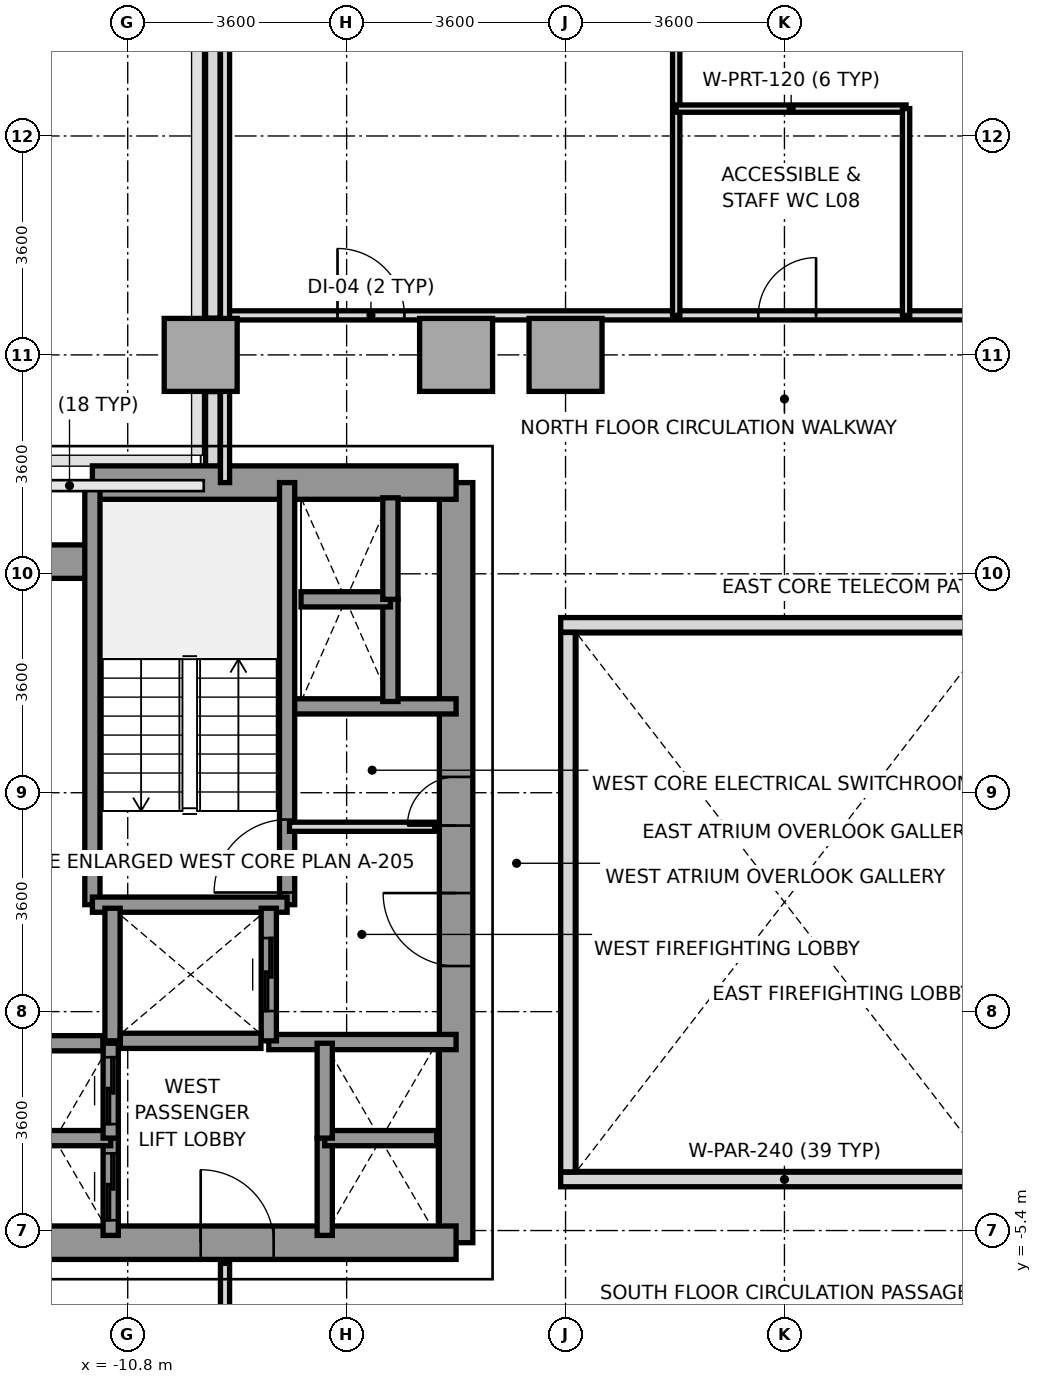
"""IFC4 building model, lengths in metres.
Left out: names, types, materials, properties, quantities, classifications, styles, units other than length and angle.
Written with IfcOpenShell. Run it as: python <this file> out.ifc"""

import sys

from ifc_helpers import new_model, si_unit, direction, frame, frame_2d, origin, origin_2d, place, context, subcontext, project, spatial, rectangle, extrude, source, transform, mapped, element, fill, save


model = new_model("IFC4")
c1 = context("Model", 3, precision=1e-05, world=origin(), true_north=direction((0.0, 1.0)))
c2 = subcontext(c1, "Body", "Model", "MODEL_VIEW")
j1 = project(units=[si_unit("LENGTHUNIT", "METRE"), si_unit("PLANEANGLEUNIT", "RADIAN")], contexts=[c1])
p1 = place(None, origin())
s1 = spatial("IfcSite", under=j1, at=p1, CompositionType="ELEMENT")
p2 = place(p1, origin())
s2 = spatial("IfcBuilding", under=s1, at=p2, CompositionType="ELEMENT")
p3 = place(p2, frame((0.0, 0.0, 37.4)))
s3 = spatial("IfcBuildingStorey", under=s2, at=p3, CompositionType="ELEMENT", Elevation=37.4)
m1 = source(origin(), c2, "Body", "SweptSolid", [
    extrude(rectangle(XDim=1.2, YDim=1.2, at=origin_2d()), origin(), (0.0, 0.0, 1.0), 3.2),
])
for number, where, z_axis, x_axis in (
    (1, (-9.6, 9.0, 0.0), (0.0, 0.0, 1.0), (1.0, 0.0, 0.0)),
    (2, (-5.4, 9.0, 0.0), (0.0, 0.0, 1.0), (1.0, 0.0, 0.0)),
    (3, (-3.6, 9.0, 0.0), (0.0, 0.0, 1.0), (1.0, 0.0, 0.0)),
):
    element("IfcColumn", number, at=place(p3, frame(where, z_axis=z_axis, x_axis=x_axis)), inside=s3, PredefinedType="COLUMN", context=c2, shape_type="MappedRepresentation", body=[
        mapped(m1, transform((0.0, 0.0, 0.0), x_axis=(1.0, 0.0, 0.0), y_axis=(0.0, 1.0, 0.0), z_axis=(0.0, 0.0, 1.0), scale=1.0)),
    ])
p4 = place(p3, frame((-9.4, 6.953, 0.0), z_axis=(0.0, 0.0, 1.0), x_axis=(0.0, 1.0, 0.0)))
e4 = element("IfcWall", 4, at=p4, inside=s3, PredefinedType="PARAPET", context=c2, shape_type="SweptSolid", body=[
    extrude(rectangle(XDim=1.444, YDim=0.24, at=frame_2d((0.722, 0.0))), origin(), (0.0, 0.0, 1.0), 1.15),
])
p5 = place(p3, frame((-9.4, 9.603, 0.0), z_axis=(0.0, 0.0, 1.0), x_axis=(0.0, 1.0, 0.0)))
e5 = element("IfcWall", 5, at=p5, inside=s3, PredefinedType="PARAPET", context=c2, shape_type="SweptSolid", body=[
    extrude(rectangle(XDim=6.0, YDim=0.24, at=frame_2d((3.0, 0.0))), origin(), (0.0, 0.0, 1.0), 1.15),
])
p6 = place(p3, frame((-5.4, -5.6, 0.0), z_axis=(0.0, 0.0, 1.0), x_axis=(0.0, 1.0, 0.0)))
e6 = element("IfcWall", 6, at=p6, inside=s3, PredefinedType="SHEAR", context=c2, shape_type="SweptSolid", body=[
    extrude(rectangle(XDim=12.5, YDim=0.55, at=frame_2d((6.25, 0.0))), origin(), (0.0, 0.0, 1.0), 3.2),
])
p7 = place(p6, frame((4.55, 0.0, 0.0)))
e7 = element("IfcOpeningElement", 7, at=p7, cuts=e6, PredefinedType="OPENING", context=c2, shape_type="SweptSolid", body=[
    extrude(rectangle(XDim=1.2, YDim=2.2, at=frame_2d((0.6, 1.1))), frame((0.0, 0.285, 0.0), z_axis=(0.0, -1.0, 0.0), x_axis=(1.0, 0.0, 0.0)), (0.0, 0.0, 1.0), 0.57),
])
p8 = place(p6, frame((6.86, 0.0, 0.0)))
e8 = element("IfcOpeningElement", 8, at=p8, cuts=e6, PredefinedType="OPENING", context=c2, shape_type="SweptSolid", body=[
    extrude(rectangle(XDim=0.8, YDim=2.1, at=frame_2d((0.4, 1.05))), frame((0.0, 0.285, 0.0), z_axis=(0.0, -1.0, 0.0), x_axis=(1.0, 0.0, 0.0)), (0.0, 0.0, 1.0), 0.57),
])
p9 = place(p3, frame((-11.381, 6.9, 0.0), z_axis=(0.0, 0.0, 1.0), x_axis=(1.0, 0.0, 0.0)))
e9 = element("IfcWall", 9, at=p9, inside=s3, PredefinedType="SHEAR", context=c2, shape_type="SweptSolid", body=[
    extrude(rectangle(XDim=5.981, YDim=0.55, at=frame_2d((2.991, 0.0))), origin(), (0.0, 0.0, 1.0), 3.2),
])
p10 = place(p3, frame((-13.2, 5.6, 0.0), z_axis=(0.0, 0.0, 1.0), x_axis=(1.0, 0.0, 0.0)))
e10 = element("IfcWall", 10, at=p10, inside=s3, PredefinedType="SHEAR", context=c2, shape_type="SweptSolid", body=[
    extrude(rectangle(XDim=1.819, YDim=0.55, at=frame_2d((0.909, 0.0))), origin(), (0.0, 0.0, 1.0), 3.2),
])
p11 = place(p3, frame((-13.2, -5.6, 0.0), z_axis=(0.0, 0.0, 1.0), x_axis=(1.0, 0.0, 0.0)))
e11 = element("IfcWall", 11, at=p11, inside=s3, PredefinedType="SHEAR", context=c2, shape_type="SweptSolid", body=[
    extrude(rectangle(XDim=7.8, YDim=0.55, at=frame_2d((3.9, 0.0))), origin(), (0.0, 0.0, 1.0), 3.2),
])
p12 = place(p11, frame((3.6, 0.0, 0.0)))
e12 = element("IfcOpeningElement", 12, at=p12, cuts=e11, PredefinedType="OPENING", context=c2, shape_type="SweptSolid", body=[
    extrude(rectangle(XDim=1.2, YDim=2.2, at=frame_2d((0.6, 1.1))), frame((0.0, 0.285, 0.0), z_axis=(0.0, -1.0, 0.0), x_axis=(1.0, 0.0, 0.0)), (0.0, 0.0, 1.0), 0.57),
])
p13 = place(p3, frame((-8.18, 3.22, 0.0), z_axis=(0.0, 0.0, 1.0), x_axis=(1.0, 0.0, 0.0)))
e13 = element("IfcWall", 13, at=p13, inside=s3, PredefinedType="SOLIDWALL", context=c2, shape_type="SweptSolid", body=[
    extrude(rectangle(XDim=2.78, YDim=0.25, at=frame_2d((1.39, 0.0))), origin(), (0.0, 0.0, 1.0), 3.2),
])
p14 = place(p3, frame((-8.48, -2.3, 0.0), z_axis=(0.0, 0.0, 1.0), x_axis=(1.0, 0.0, 0.0)))
e14 = element("IfcWall", 14, at=p14, inside=s3, PredefinedType="SOLIDWALL", context=c2, shape_type="SweptSolid", body=[
    extrude(rectangle(XDim=3.08, YDim=0.25, at=frame_2d((1.54, 0.0))), origin(), (0.0, 0.0, 1.0), 3.2),
])
p15 = place(p3, frame((-8.179, -0.041, 0.0), z_axis=(0.0, 0.0, 1.0), x_axis=(0.0, 1.0, 0.0)))
e15 = element("IfcWall", 15, at=p15, inside=s3, PredefinedType="SOLIDWALL", context=c2, shape_type="SweptSolid", body=[
    extrude(rectangle(XDim=6.941, YDim=0.25, at=frame_2d((3.47, 0.0))), origin(), (0.0, 0.0, 1.0), 3.2),
])
p16 = place(p15, frame((0.2, 0.0, 0.0)))
e16 = element("IfcOpeningElement", 16, at=p16, cuts=e15, PredefinedType="OPENING", context=c2, shape_type="SweptSolid", body=[
    extrude(rectangle(XDim=1.2, YDim=2.2, at=frame_2d((0.6, 1.1))), frame((0.0, 0.135, 0.0), z_axis=(0.0, -1.0, 0.0), x_axis=(1.0, 0.0, 0.0)), (0.0, 0.0, 1.0), 0.27),
])
p17 = place(p3, frame((-11.381, -0.041, 0.0), z_axis=(0.0, 0.0, 1.0), x_axis=(0.0, 1.0, 0.0)))
e17 = element("IfcWall", 17, at=p17, inside=s3, PredefinedType="SOLIDWALL", context=c2, shape_type="SweptSolid", body=[
    extrude(rectangle(XDim=6.941, YDim=0.25, at=frame_2d((3.47, 0.0))), origin(), (0.0, 0.0, 1.0), 3.2),
])
p18 = place(p3, frame((-11.381, -0.041, 0.0), z_axis=(0.0, 0.0, 1.0), x_axis=(1.0, 0.0, 0.0)))
e18 = element("IfcWall", 18, at=p18, inside=s3, PredefinedType="SOLIDWALL", context=c2, shape_type="SweptSolid", body=[
    extrude(rectangle(XDim=3.202, YDim=0.25, at=frame_2d((1.601, 0.0))), origin(), (0.0, 0.0, 1.0), 3.2),
])
p19 = place(p3, frame((-11.05, -2.28, 0.0), z_axis=(0.0, 0.0, 1.0), x_axis=(0.0, 1.0, 0.0)))
e19 = element("IfcWall", 19, at=p19, inside=s3, PredefinedType="SOLIDWALL", context=c2, shape_type="SweptSolid", body=[
    extrude(rectangle(XDim=2.18, YDim=0.25, at=frame_2d((1.09, 0.0))), origin(), (0.0, 0.0, 1.0), 3.2),
])
p20 = place(p3, frame((-8.48, -2.28, 0.0), z_axis=(0.0, 0.0, 1.0), x_axis=(0.0, 1.0, 0.0)))
e20 = element("IfcWall", 20, at=p20, inside=s3, PredefinedType="SOLIDWALL", context=c2, shape_type="SweptSolid", body=[
    extrude(rectangle(XDim=2.18, YDim=0.25, at=frame_2d((1.09, 0.0))), origin(), (0.0, 0.0, 1.0), 3.2),
])
p21 = place(p20, frame((0.49, 0.0, 0.0)))
e21 = element("IfcOpeningElement", 21, at=p21, cuts=e20, PredefinedType="OPENING", context=c2, shape_type="SweptSolid", body=[
    extrude(rectangle(XDim=1.2, YDim=2.2, at=frame_2d((0.6, 1.1))), frame((0.0, 0.135, 0.0), z_axis=(0.0, -1.0, 0.0), x_axis=(1.0, 0.0, 0.0)), (0.0, 0.0, 1.0), 0.27),
])
p22 = place(p3, frame((-10.921, -2.28, 0.0), z_axis=(0.0, 0.0, 1.0), x_axis=(1.0, 0.0, 0.0)))
e22 = element("IfcWall", 22, at=p22, inside=s3, PredefinedType="SOLIDWALL", context=c2, shape_type="SweptSolid", body=[
    extrude(rectangle(XDim=2.312, YDim=0.25, at=frame_2d((1.156, 0.0))), origin(), (0.0, 0.0, 1.0), 3.2),
])
p23 = place(p3, frame((-11.08, -5.48, 0.0), z_axis=(0.0, 0.0, 1.0), x_axis=(0.0, 1.0, 0.0)))
e23 = element("IfcWall", 23, at=p23, inside=s3, PredefinedType="SOLIDWALL", context=c2, shape_type="SweptSolid", body=[
    extrude(rectangle(XDim=1.6, YDim=0.25, at=frame_2d((0.8, 0.0))), origin(), (0.0, 0.0, 1.0), 3.2),
])
p24 = place(p23, frame((0.25, 0.0, 0.0)))
e24 = element("IfcOpeningElement", 24, at=p24, cuts=e23, PredefinedType="OPENING", context=c2, shape_type="SweptSolid", body=[
    extrude(rectangle(XDim=1.1, YDim=2.2, at=frame_2d((0.55, 1.1))), frame((0.0, 0.135, 0.0), z_axis=(0.0, -1.0, 0.0), x_axis=(1.0, 0.0, 0.0)), (0.0, 0.0, 1.0), 0.27),
])
p25 = place(p3, frame((-12.92, -3.88, 0.0), z_axis=(0.0, 0.0, 1.0), x_axis=(1.0, 0.0, 0.0)))
e25 = element("IfcWall", 25, at=p25, inside=s3, PredefinedType="SOLIDWALL", context=c2, shape_type="SweptSolid", body=[
    extrude(rectangle(XDim=1.84, YDim=0.25, at=frame_2d((0.92, 0.0))), origin(), (0.0, 0.0, 1.0), 3.2),
])
p26 = place(p3, frame((-11.08, -3.88, 0.0), z_axis=(0.0, 0.0, 1.0), x_axis=(0.0, 1.0, 0.0)))
e26 = element("IfcWall", 26, at=p26, inside=s3, PredefinedType="SOLIDWALL", context=c2, shape_type="SweptSolid", body=[
    extrude(rectangle(XDim=1.56, YDim=0.25, at=frame_2d((0.78, 0.0))), origin(), (0.0, 0.0, 1.0), 3.2),
])
p27 = place(p26, frame((0.23, 0.0, 0.0)))
e27 = element("IfcOpeningElement", 27, at=p27, cuts=e26, PredefinedType="OPENING", context=c2, shape_type="SweptSolid", body=[
    extrude(rectangle(XDim=1.1, YDim=2.2, at=frame_2d((0.55, 1.1))), frame((0.0, 0.135, 0.0), z_axis=(0.0, -1.0, 0.0), x_axis=(1.0, 0.0, 0.0)), (0.0, 0.0, 1.0), 0.27),
])
p28 = place(p3, frame((-12.791, -2.32, 0.0), z_axis=(0.0, 0.0, 1.0), x_axis=(1.0, 0.0, 0.0)))
e28 = element("IfcWall", 28, at=p28, inside=s3, PredefinedType="SOLIDWALL", context=c2, shape_type="SweptSolid", body=[
    extrude(rectangle(XDim=1.582, YDim=0.25, at=frame_2d((0.791, 0.0))), origin(), (0.0, 0.0, 1.0), 3.2),
])
p29 = place(p3, frame((-7.56, -5.48, 0.0), z_axis=(0.0, 0.0, 1.0), x_axis=(0.0, 1.0, 0.0)))
e29 = element("IfcWall", 29, at=p29, inside=s3, PredefinedType="SOLIDWALL", context=c2, shape_type="SweptSolid", body=[
    extrude(rectangle(XDim=1.6, YDim=0.25, at=frame_2d((0.8, 0.0))), origin(), (0.0, 0.0, 1.0), 3.2),
])
p30 = place(p3, frame((-7.56, -3.88, 0.0), z_axis=(0.0, 0.0, 1.0), x_axis=(1.0, 0.0, 0.0)))
e30 = element("IfcWall", 30, at=p30, inside=s3, PredefinedType="SOLIDWALL", context=c2, shape_type="SweptSolid", body=[
    extrude(rectangle(XDim=1.84, YDim=0.25, at=frame_2d((0.92, 0.0))), origin(), (0.0, 0.0, 1.0), 3.2),
])
p31 = place(p3, frame((-7.56, -3.88, 0.0), z_axis=(0.0, 0.0, 1.0), x_axis=(0.0, 1.0, 0.0)))
e31 = element("IfcWall", 31, at=p31, inside=s3, PredefinedType="SOLIDWALL", context=c2, shape_type="SweptSolid", body=[
    extrude(rectangle(XDim=1.56, YDim=0.25, at=frame_2d((0.78, 0.0))), origin(), (0.0, 0.0, 1.0), 3.2),
])
p32 = place(p3, frame((-6.48, 3.3, 0.0), z_axis=(0.0, 0.0, 1.0), x_axis=(0.0, 1.0, 0.0)))
e32 = element("IfcWall", 32, at=p32, inside=s3, PredefinedType="SOLIDWALL", context=c2, shape_type="SweptSolid", body=[
    extrude(rectangle(XDim=1.68, YDim=0.25, at=frame_2d((0.84, 0.0))), origin(), (0.0, 0.0, 1.0), 3.2),
])
p33 = place(p3, frame((-7.95, 4.98, 0.0), z_axis=(0.0, 0.0, 1.0), x_axis=(1.0, 0.0, 0.0)))
e33 = element("IfcWall", 33, at=p33, inside=s3, PredefinedType="SOLIDWALL", context=c2, shape_type="SweptSolid", body=[
    extrude(rectangle(XDim=1.47, YDim=0.25, at=frame_2d((0.735, 0.0))), origin(), (0.0, 0.0, 1.0), 3.2),
])
p34 = place(p3, frame((-6.48, 4.98, 0.0), z_axis=(0.0, 0.0, 1.0), x_axis=(0.0, 1.0, 0.0)))
e34 = element("IfcWall", 34, at=p34, inside=s3, PredefinedType="SOLIDWALL", context=c2, shape_type="SweptSolid", body=[
    extrude(rectangle(XDim=1.67, YDim=0.25, at=frame_2d((0.835, 0.0))), origin(), (0.0, 0.0, 1.0), 3.2),
])
p35 = place(p3, frame((-8.14, 1.24, 0.0), z_axis=(0.0, 0.0, 1.0), x_axis=(1.0, 0.0, 0.0)))
e35 = element("IfcWall", 35, at=p35, inside=s3, PredefinedType="PARTITIONING", context=c2, shape_type="SweptSolid", body=[
    extrude(rectangle(XDim=2.39, YDim=0.15, at=frame_2d((1.195, 0.0))), origin(), (0.0, 0.0, 1.0), 2.3),
])
p36 = place(p3, frame((-9.2, 9.65, 0.0), z_axis=(0.0, 0.0, 1.0), x_axis=(1.0, 0.0, 0.0)))
e36 = element("IfcWall", 36, at=p36, inside=s3, PredefinedType="PARTITIONING", context=c2, shape_type="SweptSolid", body=[
    extrude(rectangle(XDim=18.4, YDim=0.15, at=frame_2d((9.2, 0.0))), origin(), (0.0, 0.0, 1.0), 3.2),
])
p37 = place(p36, frame((8.77, 0.0, 0.0)))
e37 = element("IfcOpeningElement", 37, at=p37, cuts=e36, PredefinedType="OPENING", context=c2, shape_type="SweptSolid", body=[
    extrude(rectangle(XDim=0.95, YDim=2.15, at=frame_2d((0.475, 1.075))), frame((0.0, 0.085, 0.0), z_axis=(0.0, -1.0, 0.0), x_axis=(1.0, 0.0, 0.0)), (0.0, 0.0, 1.0), 0.17),
])
p38 = place(p36, frame((1.85, 0.0, 0.0)))
e38 = element("IfcOpeningElement", 38, at=p38, cuts=e36, PredefinedType="OPENING", context=c2, shape_type="SweptSolid", body=[
    extrude(rectangle(XDim=1.1, YDim=2.2, at=frame_2d((0.55, 1.1))), frame((0.0, 0.085, 0.0), z_axis=(0.0, -1.0, 0.0), x_axis=(1.0, 0.0, 0.0)), (0.0, 0.0, 1.0), 0.17),
])
p39 = place(p36, frame((15.6, 0.0, 0.0)))
e39 = element("IfcOpeningElement", 39, at=p39, cuts=e36, PredefinedType="OPENING", context=c2, shape_type="SweptSolid", body=[
    extrude(rectangle(XDim=0.95, YDim=2.15, at=frame_2d((0.475, 1.075))), frame((0.0, 0.085, 0.0), z_axis=(0.0, -1.0, 0.0), x_axis=(1.0, 0.0, 0.0)), (0.0, 0.0, 1.0), 0.17),
])
p40 = place(p3, frame((-9.2, 6.9, 0.0), z_axis=(0.0, 0.0, 1.0), x_axis=(0.0, 1.0, 0.0)))
e40 = element("IfcWall", 40, at=p40, inside=s3, PredefinedType="PARTITIONING", context=c2, shape_type="SweptSolid", body=[
    extrude(rectangle(XDim=8.78, YDim=0.15, at=frame_2d((4.39, 0.0))), origin(), (0.0, 0.0, 1.0), 2.65),
])
p41 = place(p3, frame((-1.78, 9.65, 0.0), z_axis=(0.0, 0.0, 1.0), x_axis=(0.0, 1.0, 0.0)))
e41 = element("IfcWall", 41, at=p41, inside=s3, PredefinedType="PARTITIONING", context=c2, shape_type="SweptSolid", body=[
    extrude(rectangle(XDim=15.0, YDim=0.12, at=frame_2d((7.5, 0.0))), origin(), (0.0, 0.0, 1.0), 2.65),
])
p42 = place(p3, frame((-1.78, 13.05, 0.0), z_axis=(0.0, 0.0, 1.0), x_axis=(1.0, 0.0, 0.0)))
e42 = element("IfcWall", 42, at=p42, inside=s3, PredefinedType="PARTITIONING", context=c2, shape_type="SweptSolid", body=[
    extrude(rectangle(XDim=3.78, YDim=0.12, at=frame_2d((1.89, 0.0))), origin(), (0.0, 0.0, 1.0), 3.2),
])
p43 = place(p3, frame((2.0, 9.65, 0.0), z_axis=(0.0, 0.0, 1.0), x_axis=(0.0, 1.0, 0.0)))
e43 = element("IfcWall", 43, at=p43, inside=s3, PredefinedType="PARTITIONING", context=c2, shape_type="SweptSolid", body=[
    extrude(rectangle(XDim=3.4, YDim=0.12, at=frame_2d((1.7, 0.0))), origin(), (0.0, 0.0, 1.0), 3.2),
])
p44 = place(p3, frame((-9.2, -15.68, 0.0), z_axis=(0.0, 0.0, 1.0), x_axis=(0.0, 1.0, 0.0)))
e44 = element("IfcWall", 44, at=p44, inside=s3, PredefinedType="PARTITIONING", context=c2, shape_type="SweptSolid", body=[
    extrude(rectangle(XDim=9.74, YDim=0.15, at=frame_2d((4.87, 0.0))), origin(), (0.0, 0.0, 1.0), 2.65),
])
for number, where, z_axis, x_axis in (
    (45, (-3.68, -4.56, 0.0), (0.0, 0.0, 1.0), (1.0, 0.0, 0.0)),
    (46, (-3.68, 4.56, 0.0), (0.0, 0.0, 1.0), (1.0, 0.0, 0.0)),
):
    element("IfcWall", number, at=place(p3, frame(where, z_axis=z_axis, x_axis=x_axis)), inside=s3, PredefinedType="PARAPET", context=c2, shape_type="SweptSolid", body=[
        extrude(rectangle(XDim=7.36, YDim=0.24, at=frame_2d((3.68, 0.0))), origin(), (0.0, 0.0, 1.0), 1.15),
    ])
p45 = place(p3, frame((-3.56, -4.435, 0.0), z_axis=(0.0, 0.0, 1.0), x_axis=(0.0, 1.0, 0.0)))
e47 = element("IfcWall", 47, at=p45, inside=s3, PredefinedType="PARAPET", context=c2, shape_type="SweptSolid", body=[
    extrude(rectangle(XDim=8.87, YDim=0.24, at=frame_2d((4.435, 0.0))), origin(), (0.0, 0.0, 1.0), 1.15),
])
m2 = source(origin(), c2, "Body", "SweptSolid", [
    extrude(rectangle(XDim=1.2, YDim=2.2, at=frame_2d((0.6, 1.1))), frame((0.0, 0.025, 0.0), z_axis=(0.0, -1.0, 0.0), x_axis=(1.0, 0.0, 0.0)), (0.0, 0.0, 1.0), 0.05),
])
p46 = place(p16, origin())
e48 = element("IfcDoor", 48, at=p46, inside=s3, OperationType="SINGLE_SWING_LEFT", PredefinedType="DOOR", context=c2, shape_type="MappedRepresentation", body=[
    mapped(m2, transform((0.0, 0.0, 0.0), x_axis=(1.0, 0.0, 0.0), y_axis=(0.0, 1.0, 0.0), z_axis=(0.0, 0.0, 1.0), scale=1.0)),
])
fill(e16, e48)
p47 = place(p7, origin())
e49 = element("IfcDoor", 49, at=p47, inside=s3, OperationType="SINGLE_SWING_RIGHT", PredefinedType="DOOR", context=c2, shape_type="MappedRepresentation", body=[
    mapped(m2, transform((0.0, 0.0, 0.0), x_axis=(1.0, 0.0, 0.0), y_axis=(0.0, 1.0, 0.0), z_axis=(0.0, 0.0, 1.0), scale=1.0)),
])
fill(e7, e49)
p48 = place(p12, origin())
e50 = element("IfcDoor", 50, at=p48, inside=s3, OperationType="SINGLE_SWING_LEFT", PredefinedType="DOOR", context=c2, shape_type="MappedRepresentation", body=[
    mapped(m2, transform((0.0, 0.0, 0.0), x_axis=(1.0, 0.0, 0.0), y_axis=(0.0, 1.0, 0.0), z_axis=(0.0, 0.0, 1.0), scale=1.0)),
])
fill(e12, e50)
m3 = source(origin(), c2, "Body", "SweptSolid", [
    extrude(rectangle(XDim=0.8, YDim=2.1, at=frame_2d((0.4, 1.05))), frame((0.0, 0.025, 0.0), z_axis=(0.0, -1.0, 0.0), x_axis=(1.0, 0.0, 0.0)), (0.0, 0.0, 1.0), 0.05),
])
p49 = place(p8, origin())
e51 = element("IfcDoor", 51, at=p49, inside=s3, OperationType="SINGLE_SWING_LEFT", PredefinedType="DOOR", context=c2, shape_type="MappedRepresentation", body=[
    mapped(m3, transform((0.0, 0.0, 0.0), x_axis=(1.0, 0.0, 0.0), y_axis=(0.0, 1.0, 0.0), z_axis=(0.0, 0.0, 1.0), scale=1.0)),
])
fill(e8, e51)
p50 = place(p21, origin())
e52 = element("IfcDoor", 52, at=p50, inside=s3, OperationType="SLIDING_TO_RIGHT", PredefinedType="DOOR", context=c2, shape_type="MappedRepresentation", body=[
    mapped(m2, transform((0.0, 0.0, 0.0), x_axis=(1.0, 0.0, 0.0), y_axis=(0.0, 1.0, 0.0), z_axis=(0.0, 0.0, 1.0), scale=1.0)),
])
fill(e21, e52)
m4 = source(origin(), c2, "Body", "SweptSolid", [
    extrude(rectangle(XDim=1.1, YDim=2.2, at=frame_2d((0.55, 1.1))), frame((0.0, 0.025, 0.0), z_axis=(0.0, -1.0, 0.0), x_axis=(1.0, 0.0, 0.0)), (0.0, 0.0, 1.0), 0.05),
])
p51 = place(p24, origin())
e53 = element("IfcDoor", 53, at=p51, inside=s3, OperationType="SLIDING_TO_LEFT", PredefinedType="DOOR", context=c2, shape_type="MappedRepresentation", body=[
    mapped(m4, transform((0.0, 0.0, 0.0), x_axis=(1.0, 0.0, 0.0), y_axis=(0.0, 1.0, 0.0), z_axis=(0.0, 0.0, 1.0), scale=1.0)),
])
fill(e24, e53)
p52 = place(p27, origin())
e54 = element("IfcDoor", 54, at=p52, inside=s3, OperationType="SLIDING_TO_LEFT", PredefinedType="DOOR", context=c2, shape_type="MappedRepresentation", body=[
    mapped(m4, transform((0.0, 0.0, 0.0), x_axis=(1.0, 0.0, 0.0), y_axis=(0.0, 1.0, 0.0), z_axis=(0.0, 0.0, 1.0), scale=1.0)),
])
fill(e27, e54)
m5 = source(origin(), c2, "Body", "SweptSolid", [
    extrude(rectangle(XDim=0.95, YDim=2.15, at=frame_2d((0.475, 1.075))), frame((0.0, 0.025, 0.0), z_axis=(0.0, -1.0, 0.0), x_axis=(1.0, 0.0, 0.0)), (0.0, 0.0, 1.0), 0.05),
])
p53 = place(p37, origin())
e55 = element("IfcDoor", 55, at=p53, inside=s3, OperationType="SINGLE_SWING_RIGHT", PredefinedType="DOOR", context=c2, shape_type="MappedRepresentation", body=[
    mapped(m5, transform((0.0, 0.0, 0.0), x_axis=(1.0, 0.0, 0.0), y_axis=(0.0, 1.0, 0.0), z_axis=(0.0, 0.0, 1.0), scale=1.0)),
])
fill(e37, e55)
p54 = place(p38, origin())
e56 = element("IfcDoor", 56, at=p54, inside=s3, OperationType="SINGLE_SWING_LEFT", PredefinedType="DOOR", context=c2, shape_type="MappedRepresentation", body=[
    mapped(m4, transform((0.0, 0.0, 0.0), x_axis=(1.0, 0.0, 0.0), y_axis=(0.0, 1.0, 0.0), z_axis=(0.0, 0.0, 1.0), scale=1.0)),
])
fill(e38, e56)
save(model, sys.argv[1])
